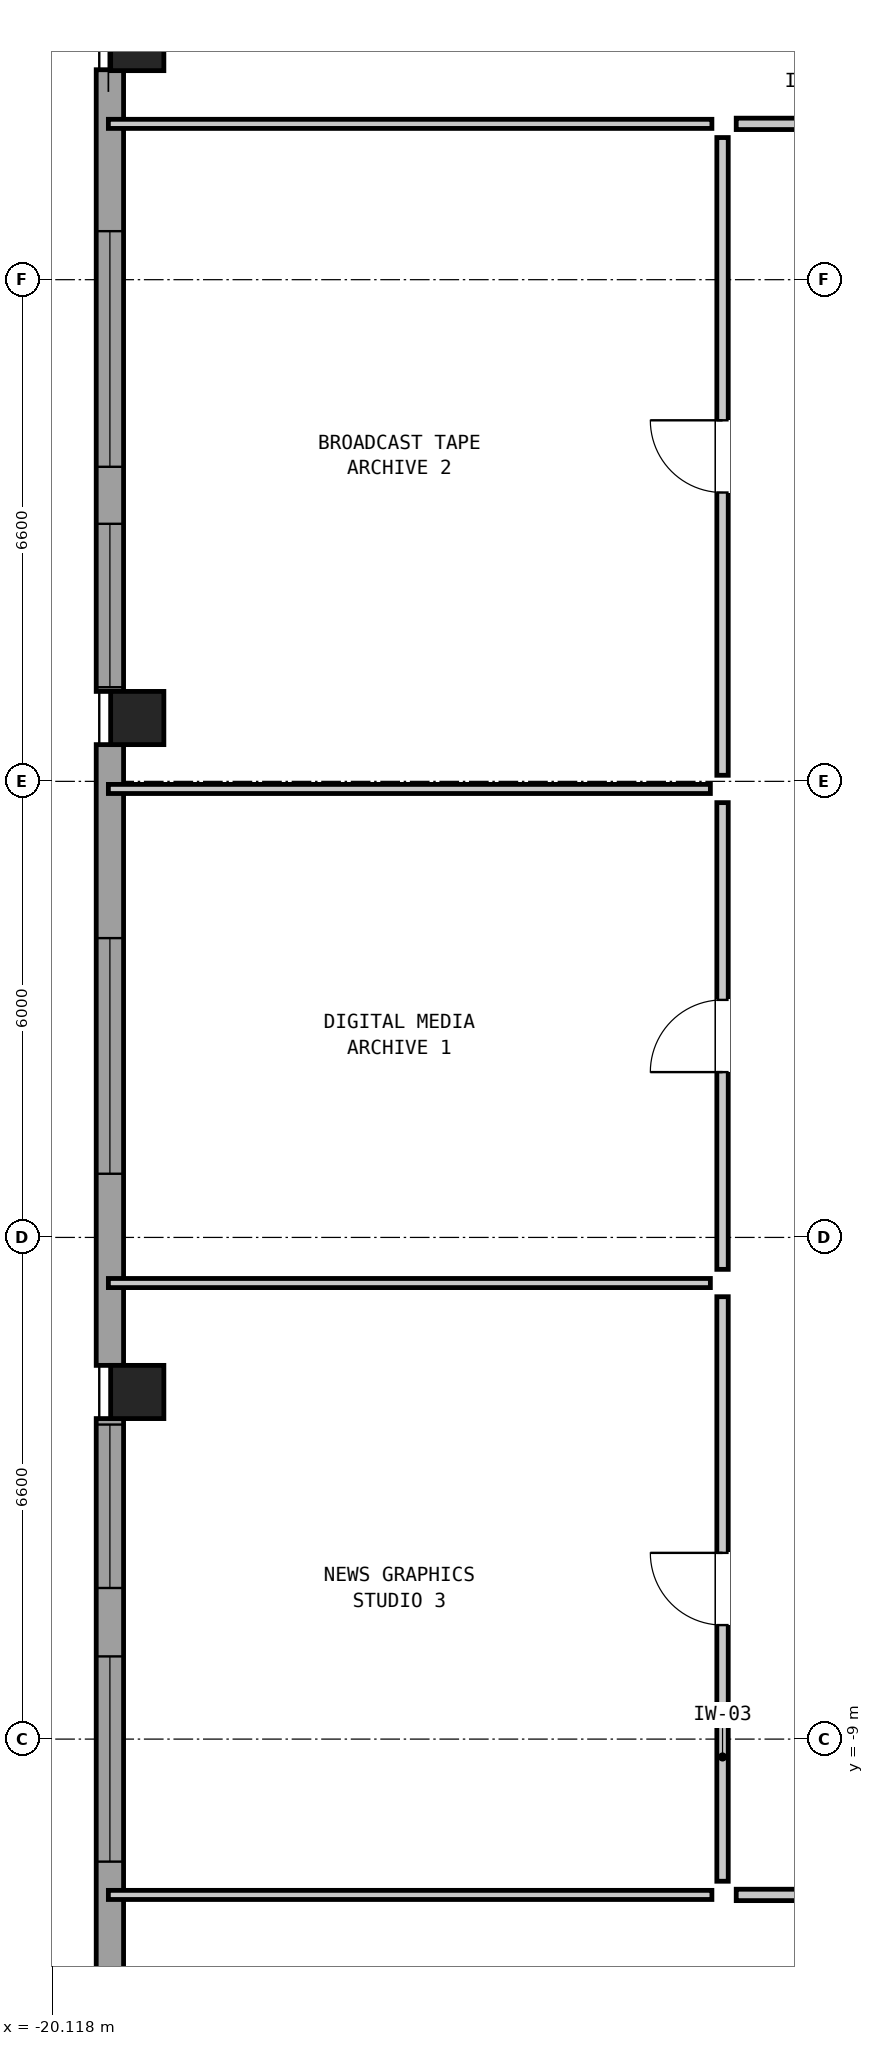
"""IFC4 building model, lengths in metres.
Left out: names, types, materials, properties, quantities, classifications, styles, units other than length and angle.
Written with IfcOpenShell. Run it as: python <this file> out.ifc"""

import sys

from ifc_helpers import new_model, si_unit, direction, frame, frame_2d, origin, origin_2d, place, context, subcontext, project, spatial, rectangle, hollow_rectangle, extrude, element, fill, save


model = new_model("IFC4")
c1 = context("Model", 3, precision=1e-05, world=origin(), true_north=direction((0.0, 1.0)))
c2 = subcontext(c1, "Body", "Model", "MODEL_VIEW")
j1 = project(units=[si_unit("LENGTHUNIT", "METRE"), si_unit("PLANEANGLEUNIT", "RADIAN")], contexts=[c1])
p1 = place(None, origin())
s1 = spatial("IfcSite", under=j1, at=p1, CompositionType="ELEMENT")
p2 = place(p1, origin())
s2 = spatial("IfcBuilding", under=s1, at=p2, CompositionType="ELEMENT")
p3 = place(p2, frame((0.0, 0.0, 217.8)))
s3 = spatial("IfcBuildingStorey", under=s2, at=p3, CompositionType="ELEMENT", Elevation=217.8)
for number, where, z_axis, x_axis in (
    (1, (-19.0, 13.3, 0.0), (0.0, 0.0, 1.0), (0.0, 1.0, 0.0)),
    (2, (-19.0, 4.433, 0.0), (0.0, 0.0, 1.0), (0.0, 1.0, 0.0)),
    (3, (-19.0, -4.433, 0.0), (0.0, 0.0, 1.0), (0.0, 1.0, 0.0)),
):
    element("IfcColumn", number, at=place(p3, frame(where, z_axis=z_axis, x_axis=x_axis)), inside=s3, PredefinedType="COLUMN", context=c2, shape_type="SweptSolid", body=[
        extrude(hollow_rectangle(XDim=0.7, YDim=0.7, WallThickness=0.045, at=origin_2d()), origin(), (0.0, 0.0, 1.0), 3.05),
    ])
p4 = place(p3, frame((-19.36, -12.962, 0.0), z_axis=(0.0, 0.0, 1.0), x_axis=(0.0, 1.0, 0.0)))
e4 = element("IfcWall", 4, at=p4, inside=s3, PredefinedType="SOLIDWALL", context=c2, shape_type="SweptSolid", body=[
    extrude(rectangle(XDim=8.179, YDim=0.36, at=frame_2d((4.089, 0.0))), origin(), (0.0, 0.0, 1.0), 2.374),
])
p5 = place(p4, frame((2.35, 0.0, 1.3)))
e5 = element("IfcOpeningElement", 5, at=p5, cuts=e4, PredefinedType="OPENING", context=c2, shape_type="SweptSolid", body=[
    extrude(rectangle(XDim=2.7, YDim=0.9, at=frame_2d((1.35, 0.45))), frame((0.0, 0.192, 0.0), z_axis=(0.0, -1.0, 0.0), x_axis=(1.0, 0.0, 0.0)), (0.0, 0.0, 1.0), 0.384),
])
p6 = place(p4, frame((5.95, 0.0, 0.2)))
e6 = element("IfcOpeningElement", 6, at=p6, cuts=e4, PredefinedType="OPENING", context=c2, shape_type="SweptSolid", body=[
    extrude(rectangle(XDim=2.15, YDim=1.05, at=frame_2d((1.075, 0.525))), frame((0.0, 0.192, 0.0), z_axis=(0.0, -1.0, 0.0), x_axis=(1.0, 0.0, 0.0)), (0.0, 0.0, 1.0), 0.384),
])
p7 = place(p3, frame((-19.36, -4.083, 0.0), z_axis=(0.0, 0.0, 1.0), x_axis=(0.0, 1.0, 0.0)))
e7 = element("IfcWall", 7, at=p7, inside=s3, PredefinedType="SOLIDWALL", context=c2, shape_type="SweptSolid", body=[
    extrude(rectangle(XDim=8.167, YDim=0.36, at=frame_2d((4.083, 0.0))), origin(), (0.0, 0.0, 1.0), 2.374),
])
p8 = place(p7, frame((2.521, 0.0, 1.4)))
e8 = element("IfcOpeningElement", 8, at=p8, cuts=e7, PredefinedType="OPENING", context=c2, shape_type="SweptSolid", body=[
    extrude(rectangle(XDim=3.1, YDim=0.8, at=frame_2d((1.55, 0.4))), frame((0.0, 0.192, 0.0), z_axis=(0.0, -1.0, 0.0), x_axis=(1.0, 0.0, 0.0)), (0.0, 0.0, 1.0), 0.384),
])
p9 = place(p3, frame((-19.36, 4.783, 0.0), z_axis=(0.0, 0.0, 1.0), x_axis=(0.0, 1.0, 0.0)))
e9 = element("IfcWall", 9, at=p9, inside=s3, PredefinedType="SOLIDWALL", context=c2, shape_type="SweptSolid", body=[
    extrude(rectangle(XDim=8.179, YDim=0.36, at=frame_2d((4.089, 0.0))), origin(), (0.0, 0.0, 1.0), 2.374),
])
p10 = place(p9, frame((0.055, 0.0, 0.2)))
e10 = element("IfcOpeningElement", 10, at=p10, cuts=e9, PredefinedType="OPENING", context=c2, shape_type="SweptSolid", body=[
    extrude(rectangle(XDim=2.15, YDim=1.05, at=frame_2d((1.075, 0.525))), frame((0.0, 0.192, 0.0), z_axis=(0.0, -1.0, 0.0), x_axis=(1.0, 0.0, 0.0)), (0.0, 0.0, 1.0), 0.384),
])
p11 = place(p9, frame((2.955, 0.0, 1.4)))
e11 = element("IfcOpeningElement", 11, at=p11, cuts=e9, PredefinedType="OPENING", context=c2, shape_type="SweptSolid", body=[
    extrude(rectangle(XDim=3.1, YDim=0.8, at=frame_2d((1.55, 0.4))), frame((0.0, 0.192, 0.0), z_axis=(0.0, -1.0, 0.0), x_axis=(1.0, 0.0, 0.0)), (0.0, 0.0, 1.0), 0.384),
])
for number, where, z_axis, x_axis in (
    (12, (-19.38, 12.25, 0.0), (0.0, 0.0, 1.0), (1.0, 0.0, 0.0)),
    (13, (-19.38, -11.05, 0.0), (0.0, 0.0, 1.0), (1.0, 0.0, 0.0)),
):
    element("IfcWall", number, at=place(p3, frame(where, z_axis=z_axis, x_axis=x_axis)), inside=s3, PredefinedType="PARTITIONING", context=c2, shape_type="SweptSolid", body=[
        extrude(rectangle(XDim=7.94, YDim=0.12, at=frame_2d((3.97, 0.0))), origin(), (0.0, 0.0, 1.0), 2.86),
    ])
for number, where, z_axis, x_axis in (
    (14, (-19.38, -3.0, 0.0), (0.0, 0.0, 1.0), (1.0, 0.0, 0.0)),
    (15, (-19.38, 3.5, 0.0), (0.0, 0.0, 1.0), (1.0, 0.0, 0.0)),
):
    element("IfcWall", number, at=place(p3, frame(where, z_axis=z_axis, x_axis=x_axis)), inside=s3, PredefinedType="PARTITIONING", context=c2, shape_type="SweptSolid", body=[
        extrude(rectangle(XDim=7.92, YDim=0.12, at=frame_2d((3.96, 0.0))), origin(), (0.0, 0.0, 1.0), 1.981),
    ])
p12 = place(p3, frame((-11.12, 12.25, 0.0), z_axis=(0.0, 0.0, 1.0), x_axis=(1.0, 0.0, 0.0)))
e16 = element("IfcWall", 16, at=p12, inside=s3, PredefinedType="PARTITIONING", context=c2, shape_type="SweptSolid", body=[
    extrude(rectangle(XDim=4.44, YDim=0.15, at=frame_2d((2.22, 0.0))), origin(), (0.0, 0.0, 1.0), 2.86),
])
p13 = place(p12, frame((2.145, 0.0, 0.0)))
e17 = element("IfcOpeningElement", 17, at=p13, cuts=e16, PredefinedType="OPENING", context=c2, shape_type="SweptSolid", body=[
    extrude(rectangle(XDim=0.95, YDim=2.1, at=frame_2d((0.475, 1.05))), frame((0.0, 0.087, 0.0), z_axis=(0.0, -1.0, 0.0), x_axis=(1.0, 0.0, 0.0)), (0.0, 0.0, 1.0), 0.174),
])
p14 = place(p3, frame((-11.12, -11.05, 0.0), z_axis=(0.0, 0.0, 1.0), x_axis=(1.0, 0.0, 0.0)))
e18 = element("IfcWall", 18, at=p14, inside=s3, PredefinedType="PARTITIONING", context=c2, shape_type="SweptSolid", body=[
    extrude(rectangle(XDim=4.94, YDim=0.15, at=frame_2d((2.47, 0.0))), origin(), (0.0, 0.0, 1.0), 2.86),
])
p15 = place(p14, frame((2.195, 0.0, 0.0)))
e19 = element("IfcOpeningElement", 19, at=p15, cuts=e18, PredefinedType="OPENING", context=c2, shape_type="SweptSolid", body=[
    extrude(rectangle(XDim=0.95, YDim=2.1, at=frame_2d((0.475, 1.05))), frame((0.0, 0.087, 0.0), z_axis=(0.0, -1.0, 0.0), x_axis=(1.0, 0.0, 0.0)), (0.0, 0.0, 1.0), 0.174),
])
p16 = place(p3, frame((-11.3, -10.87, 0.0), z_axis=(0.0, 0.0, 1.0), x_axis=(0.0, 1.0, 0.0)))
e20 = element("IfcWall", 20, at=p16, inside=s3, PredefinedType="PARTITIONING", context=c2, shape_type="SweptSolid", body=[
    extrude(rectangle(XDim=7.69, YDim=0.15, at=frame_2d((3.845, 0.0))), origin(), (0.0, 0.0, 1.0), 2.86),
])
p17 = place(p16, frame((3.37, 0.0, 0.0)))
e21 = element("IfcOpeningElement", 21, at=p17, cuts=e20, PredefinedType="OPENING", context=c2, shape_type="SweptSolid", body=[
    extrude(rectangle(XDim=0.95, YDim=2.1, at=frame_2d((0.475, 1.05))), frame((0.0, 0.087, 0.0), z_axis=(0.0, -1.0, 0.0), x_axis=(1.0, 0.0, 0.0)), (0.0, 0.0, 1.0), 0.174),
])
p18 = place(p3, frame((-11.3, -2.82, 0.0), z_axis=(0.0, 0.0, 1.0), x_axis=(0.0, 1.0, 0.0)))
e22 = element("IfcWall", 22, at=p18, inside=s3, PredefinedType="PARTITIONING", context=c2, shape_type="SweptSolid", body=[
    extrude(rectangle(XDim=6.14, YDim=0.15, at=frame_2d((3.07, 0.0))), origin(), (0.0, 0.0, 1.0), 2.86),
])
p19 = place(p18, frame((2.595, 0.0, 0.0)))
e23 = element("IfcOpeningElement", 23, at=p19, cuts=e22, PredefinedType="OPENING", context=c2, shape_type="SweptSolid", body=[
    extrude(rectangle(XDim=0.95, YDim=2.1, at=frame_2d((0.475, 1.05))), frame((0.0, 0.087, 0.0), z_axis=(0.0, -1.0, 0.0), x_axis=(1.0, 0.0, 0.0)), (0.0, 0.0, 1.0), 0.174),
])
p20 = place(p3, frame((-11.3, 3.68, 0.0), z_axis=(0.0, 0.0, 1.0), x_axis=(0.0, 1.0, 0.0)))
e24 = element("IfcWall", 24, at=p20, inside=s3, PredefinedType="PARTITIONING", context=c2, shape_type="SweptSolid", body=[
    extrude(rectangle(XDim=8.39, YDim=0.15, at=frame_2d((4.195, 0.0))), origin(), (0.0, 0.0, 1.0), 2.86),
])
p21 = place(p20, frame((3.72, 0.0, 0.0)))
e25 = element("IfcOpeningElement", 25, at=p21, cuts=e24, PredefinedType="OPENING", context=c2, shape_type="SweptSolid", body=[
    extrude(rectangle(XDim=0.95, YDim=2.1, at=frame_2d((0.475, 1.05))), frame((0.0, 0.087, 0.0), z_axis=(0.0, -1.0, 0.0), x_axis=(1.0, 0.0, 0.0)), (0.0, 0.0, 1.0), 0.174),
])
p22 = place(p5, origin())
e26 = element("IfcWindow", 26, at=p22, inside=s3, PartitioningType="SINGLE_PANEL", PredefinedType="WINDOW", context=c2, shape_type="SweptSolid", body=[
    extrude(rectangle(XDim=2.7, YDim=0.9, at=frame_2d((1.35, 0.45))), frame((0.0, 0.03, 0.0), z_axis=(0.0, -1.0, 0.0), x_axis=(1.0, 0.0, 0.0)), (0.0, 0.0, 1.0), 0.06),
])
fill(e5, e26)
p23 = place(p6, origin())
e27 = element("IfcWindow", 27, at=p23, inside=s3, PartitioningType="SINGLE_PANEL", PredefinedType="WINDOW", context=c2, shape_type="SweptSolid", body=[
    extrude(rectangle(XDim=2.15, YDim=1.05, at=frame_2d((1.075, 0.525))), frame((0.0, 0.03, 0.0), z_axis=(0.0, -1.0, 0.0), x_axis=(1.0, 0.0, 0.0)), (0.0, 0.0, 1.0), 0.06),
])
fill(e6, e27)
p24 = place(p8, origin())
e28 = element("IfcWindow", 28, at=p24, inside=s3, PartitioningType="SINGLE_PANEL", PredefinedType="WINDOW", context=c2, shape_type="SweptSolid", body=[
    extrude(rectangle(XDim=3.1, YDim=0.8, at=frame_2d((1.55, 0.4))), frame((0.0, 0.03, 0.0), z_axis=(0.0, -1.0, 0.0), x_axis=(1.0, 0.0, 0.0)), (0.0, 0.0, 1.0), 0.06),
])
fill(e8, e28)
p25 = place(p10, origin())
e29 = element("IfcWindow", 29, at=p25, inside=s3, PartitioningType="SINGLE_PANEL", PredefinedType="WINDOW", context=c2, shape_type="SweptSolid", body=[
    extrude(rectangle(XDim=2.15, YDim=1.05, at=frame_2d((1.075, 0.525))), frame((0.0, 0.03, 0.0), z_axis=(0.0, -1.0, 0.0), x_axis=(1.0, 0.0, 0.0)), (0.0, 0.0, 1.0), 0.06),
])
fill(e10, e29)
p26 = place(p11, origin())
e30 = element("IfcWindow", 30, at=p26, inside=s3, PartitioningType="SINGLE_PANEL", PredefinedType="WINDOW", context=c2, shape_type="SweptSolid", body=[
    extrude(rectangle(XDim=3.1, YDim=0.8, at=frame_2d((1.55, 0.4))), frame((0.0, 0.03, 0.0), z_axis=(0.0, -1.0, 0.0), x_axis=(1.0, 0.0, 0.0)), (0.0, 0.0, 1.0), 0.06),
])
fill(e11, e30)
p27 = place(p17, origin())
e31 = element("IfcDoor", 31, at=p27, inside=s3, OperationType="SINGLE_SWING_RIGHT", PredefinedType="DOOR", context=c2, shape_type="SweptSolid", body=[
    extrude(rectangle(XDim=0.95, YDim=2.1, at=frame_2d((0.475, 1.05))), frame((0.0, 0.025, 0.0), z_axis=(0.0, -1.0, 0.0), x_axis=(1.0, 0.0, 0.0)), (0.0, 0.0, 1.0), 0.05),
])
fill(e21, e31)
p28 = place(p19, origin())
e32 = element("IfcDoor", 32, at=p28, inside=s3, OperationType="SINGLE_SWING_LEFT", PredefinedType="DOOR", context=c2, shape_type="SweptSolid", body=[
    extrude(rectangle(XDim=0.95, YDim=2.1, at=frame_2d((0.475, 1.05))), frame((0.0, 0.025, 0.0), z_axis=(0.0, -1.0, 0.0), x_axis=(1.0, 0.0, 0.0)), (0.0, 0.0, 1.0), 0.05),
])
fill(e23, e32)
p29 = place(p21, origin())
e33 = element("IfcDoor", 33, at=p29, inside=s3, OperationType="SINGLE_SWING_RIGHT", PredefinedType="DOOR", context=c2, shape_type="SweptSolid", body=[
    extrude(rectangle(XDim=0.95, YDim=2.1, at=frame_2d((0.475, 1.05))), frame((0.0, 0.025, 0.0), z_axis=(0.0, -1.0, 0.0), x_axis=(1.0, 0.0, 0.0)), (0.0, 0.0, 1.0), 0.05),
])
fill(e25, e33)
save(model, sys.argv[1])
